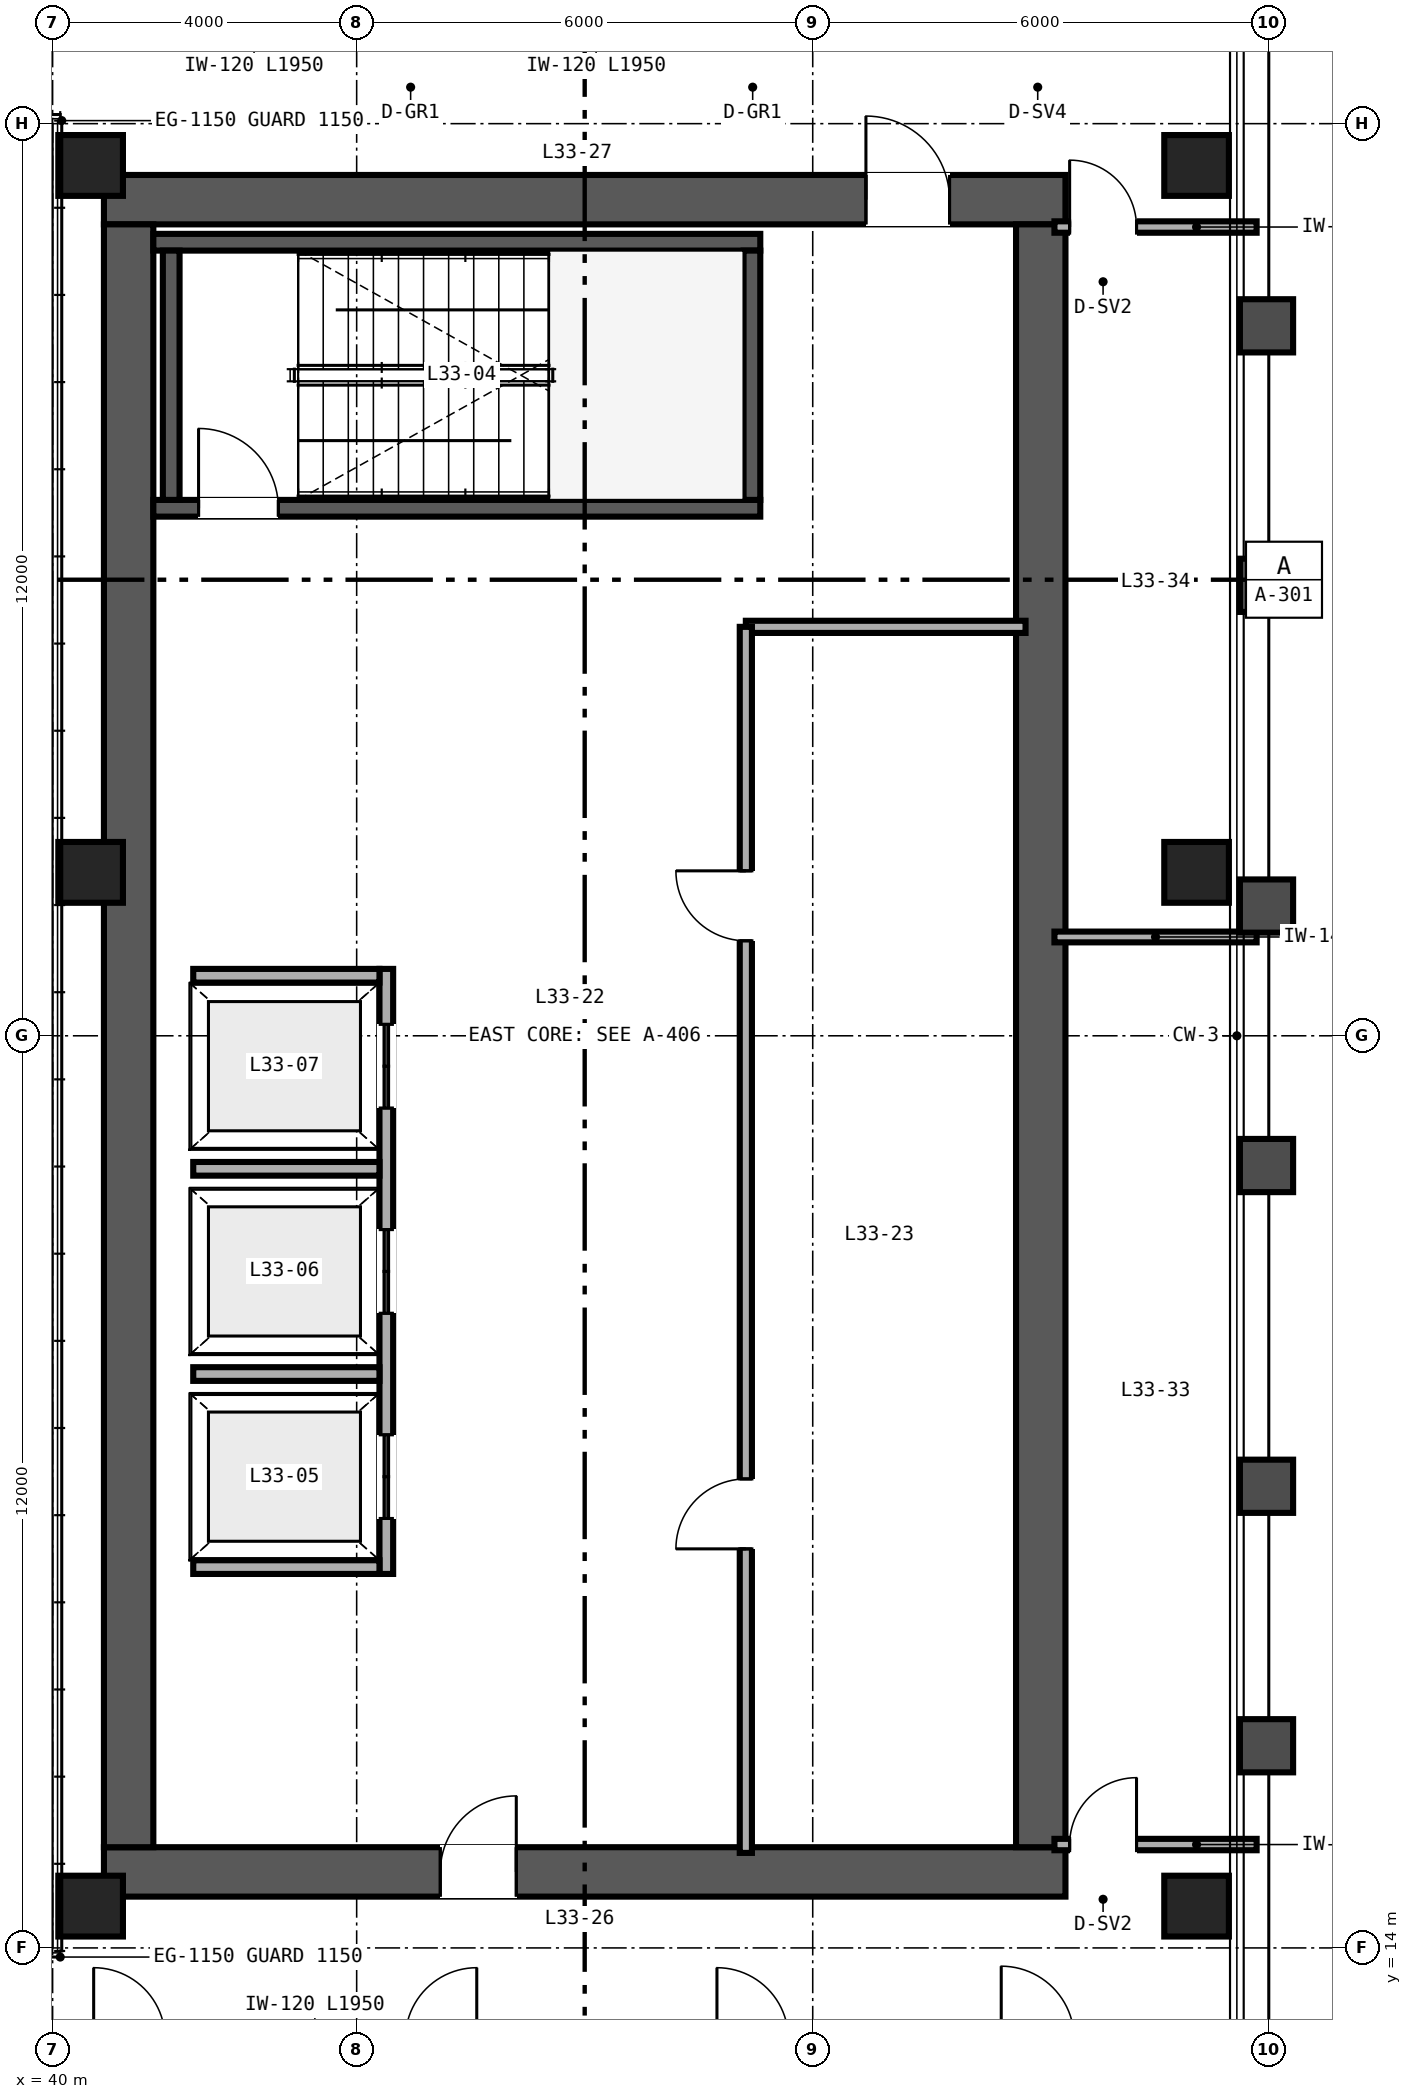
"""IFC4 building model, lengths in metres.
Left out: names, types, materials, properties, quantities, classifications, styles, units other than length and angle.
Written with IfcOpenShell. Run it as: python <this file> out.ifc"""

import sys

from ifc_helpers import new_model, si_unit, direction, frame, frame_2d, origin, origin_2d, place, context, subcontext, project, spatial, rectangle, hollow_rectangle, extrude, source, transform, mapped, element, fill, save


model = new_model("IFC4")
c1 = context("Model", 3, precision=1e-05, world=origin(), true_north=direction((0.0, 1.0)))
c2 = subcontext(c1, "Body", "Model", "MODEL_VIEW")
j1 = project(units=[si_unit("LENGTHUNIT", "METRE"), si_unit("PLANEANGLEUNIT", "RADIAN")], contexts=[c1])
p1 = place(None, origin())
s1 = spatial("IfcSite", under=j1, at=p1, CompositionType="ELEMENT")
p2 = place(p1, origin())
s2 = spatial("IfcBuilding", under=s1, at=p2, CompositionType="ELEMENT")
p3 = place(p2, frame((0.0, 0.0, 133.2)))
s3 = spatial("IfcBuildingStorey", under=s2, at=p3, CompositionType="ELEMENT", Elevation=133.2)
p4 = place(p3, frame((40.675, 15.0, 0.0), z_axis=(0.0, 0.0, 1.0), x_axis=(1.0, 0.0, 0.0)))
e1 = element("IfcWall", 1, at=p4, inside=s3, PredefinedType="SHEAR", context=c2, shape_type="SweptSolid", body=[
    extrude(rectangle(XDim=12.65, YDim=0.65, at=frame_2d((6.325, 0.0))), origin(), (0.0, 0.0, 1.0), 3.36),
])
p5 = place(p4, frame((4.425, 0.0, 0.0)))
e2 = element("IfcOpeningElement", 2, at=p5, cuts=e1, PredefinedType="OPENING", context=c2, shape_type="SweptSolid", body=[
    extrude(rectangle(XDim=1.0, YDim=2.15, at=frame_2d((0.5, 1.075))), frame((0.0, 0.335, 0.0), z_axis=(0.0, -1.0, 0.0), x_axis=(1.0, 0.0, 0.0)), (0.0, 0.0, 1.0), 0.67),
])
p6 = place(p3, frame((40.675, 37.0, 0.0), z_axis=(0.0, 0.0, 1.0), x_axis=(1.0, 0.0, 0.0)))
e3 = element("IfcWall", 3, at=p6, inside=s3, PredefinedType="SHEAR", context=c2, shape_type="SweptSolid", body=[
    extrude(rectangle(XDim=12.65, YDim=0.65, at=frame_2d((6.325, 0.0))), origin(), (0.0, 0.0, 1.0), 3.36),
])
p7 = place(p6, frame((10.025, 0.0, 0.0)))
e4 = element("IfcOpeningElement", 4, at=p7, cuts=e3, PredefinedType="OPENING", context=c2, shape_type="SweptSolid", body=[
    extrude(rectangle(XDim=1.1, YDim=2.15, at=frame_2d((0.55, 1.075))), frame((0.0, 0.335, 0.0), z_axis=(0.0, -1.0, 0.0), x_axis=(1.0, 0.0, 0.0)), (0.0, 0.0, 1.0), 0.67),
])
for number, where, z_axis, x_axis in (
    (5, (41.0, 15.325, 0.0), (0.0, 0.0, 1.0), (0.0, 1.0, 0.0)),
    (6, (53.0, 15.325, 0.0), (0.0, 0.0, 1.0), (0.0, 1.0, 0.0)),
):
    element("IfcWall", number, at=place(p3, frame(where, z_axis=z_axis, x_axis=x_axis)), inside=s3, PredefinedType="SHEAR", context=c2, shape_type="SweptSolid", body=[
        extrude(rectangle(XDim=21.35, YDim=0.65, at=frame_2d((10.675, 0.0))), origin(), (0.0, 0.0, 1.0), 3.36),
    ])
p8 = place(p3, frame((41.325, 32.94, 0.0), z_axis=(0.0, 0.0, 1.0), x_axis=(1.0, 0.0, 0.0)))
e7 = element("IfcWall", 7, at=p8, inside=s3, PredefinedType="SHEAR", context=c2, shape_type="SweptSolid", body=[
    extrude(rectangle(XDim=7.985, YDim=0.22, at=frame_2d((3.993, 0.0))), origin(), (0.0, 0.0, 1.0), 3.4),
])
p9 = place(p8, frame((0.595, 0.0, 0.0)))
e8 = element("IfcOpeningElement", 8, at=p9, cuts=e7, PredefinedType="OPENING", context=c2, shape_type="SweptSolid", body=[
    extrude(rectangle(XDim=1.05, YDim=2.15, at=frame_2d((0.525, 1.075))), frame((0.0, 0.12, 0.0), z_axis=(0.0, -1.0, 0.0), x_axis=(1.0, 0.0, 0.0)), (0.0, 0.0, 1.0), 0.24),
])
p10 = place(p3, frame((41.325, 36.44, 0.0), z_axis=(0.0, 0.0, 1.0), x_axis=(1.0, 0.0, 0.0)))
e9 = element("IfcWall", 9, at=p10, inside=s3, PredefinedType="SHEAR", context=c2, shape_type="SweptSolid", body=[
    extrude(rectangle(XDim=7.985, YDim=0.22, at=frame_2d((3.993, 0.0))), origin(), (0.0, 0.0, 1.0), 3.4),
])
for number, where, z_axis, x_axis in (
    (10, (41.56, 33.05, 0.0), (0.0, 0.0, 1.0), (0.0, 1.0, 0.0)),
    (11, (49.2, 33.05, 0.0), (0.0, 0.0, 1.0), (0.0, 1.0, 0.0)),
):
    element("IfcWall", number, at=place(p3, frame(where, z_axis=z_axis, x_axis=x_axis)), inside=s3, PredefinedType="SHEAR", context=c2, shape_type="SweptSolid", body=[
        extrude(rectangle(XDim=3.28, YDim=0.22, at=frame_2d((1.64, 0.0))), origin(), (0.0, 0.0, 1.0), 3.4),
    ])
m1 = source(origin(), c2, "Body", "SweptSolid", [
    extrude(hollow_rectangle(XDim=0.85, YDim=0.8, WallThickness=0.032, at=origin_2d()), origin(), (0.0, 0.0, 1.0), 3.36),
])
for number, where, z_axis, x_axis in (
    (12, (40.5, 14.55, 0.0), (0.0, 0.0, 1.0), (1.0, 0.0, 0.0)),
    (13, (55.05, 14.55, 0.0), (0.0, 0.0, 1.0), (1.0, 0.0, 0.0)),
    (14, (40.5, 28.15, 0.0), (0.0, 0.0, 1.0), (1.0, 0.0, 0.0)),
    (15, (55.05, 28.15, 0.0), (0.0, 0.0, 1.0), (1.0, 0.0, 0.0)),
    (16, (40.5, 37.45, 0.0), (0.0, 0.0, 1.0), (1.0, 0.0, 0.0)),
    (17, (55.05, 37.45, 0.0), (0.0, 0.0, 1.0), (1.0, 0.0, 0.0)),
):
    element("IfcColumn", number, at=place(p3, frame(where, z_axis=z_axis, x_axis=x_axis)), inside=s3, PredefinedType="COLUMN", context=c2, shape_type="MappedRepresentation", body=[
        mapped(m1, transform((0.0, 0.0, 0.0), scale=1.0)),
    ])
p11 = place(p3, frame((44.39, 18.92, 0.0), z_axis=(0.0, 0.0, 1.0), x_axis=(0.0, 1.0, 0.0)))
e18 = element("IfcWall", 18, at=p11, inside=s3, PredefinedType="SOLIDWALL", context=c2, shape_type="SweptSolid", body=[
    extrude(rectangle(XDim=7.96, YDim=0.18, at=frame_2d((3.98, 0.0))), origin(), (0.0, 0.0, 1.0), 3.36),
])
p12 = place(p11, frame((0.73, 0.0, 0.0)))
e19 = element("IfcOpeningElement", 19, at=p12, cuts=e18, PredefinedType="OPENING", context=c2, shape_type="SweptSolid", body=[
    extrude(rectangle(XDim=1.1, YDim=2.2, at=frame_2d((0.55, 1.1))), frame((0.0, 0.1, 0.0), z_axis=(0.0, -1.0, 0.0), x_axis=(1.0, 0.0, 0.0)), (0.0, 0.0, 1.0), 0.2),
])
p13 = place(p11, frame((3.43, 0.0, 0.0)))
e20 = element("IfcOpeningElement", 20, at=p13, cuts=e18, PredefinedType="OPENING", context=c2, shape_type="SweptSolid", body=[
    extrude(rectangle(XDim=1.1, YDim=2.2, at=frame_2d((0.55, 1.1))), frame((0.0, 0.1, 0.0), z_axis=(0.0, -1.0, 0.0), x_axis=(1.0, 0.0, 0.0)), (0.0, 0.0, 1.0), 0.2),
])
p14 = place(p11, frame((6.13, 0.0, 0.0)))
e21 = element("IfcOpeningElement", 21, at=p14, cuts=e18, PredefinedType="OPENING", context=c2, shape_type="SweptSolid", body=[
    extrude(rectangle(XDim=1.1, YDim=2.2, at=frame_2d((0.55, 1.1))), frame((0.0, 0.1, 0.0), z_axis=(0.0, -1.0, 0.0), x_axis=(1.0, 0.0, 0.0)), (0.0, 0.0, 1.0), 0.2),
])
for number, where, z_axis, x_axis in (
    (22, (41.85, 19.01, 0.0), (0.0, 0.0, 1.0), (1.0, 0.0, 0.0)),
    (23, (41.85, 26.79, 0.0), (0.0, 0.0, 1.0), (1.0, 0.0, 0.0)),
    (24, (41.85, 21.55, 0.0), (0.0, 0.0, 1.0), (1.0, 0.0, 0.0)),
    (25, (41.85, 24.25, 0.0), (0.0, 0.0, 1.0), (1.0, 0.0, 0.0)),
):
    element("IfcWall", number, at=place(p3, frame(where, z_axis=z_axis, x_axis=x_axis)), inside=s3, PredefinedType="SOLIDWALL", context=c2, shape_type="SweptSolid", body=[
        extrude(rectangle(XDim=2.45, YDim=0.18, at=frame_2d((1.225, 0.0))), origin(), (0.0, 0.0, 1.0), 3.36),
    ])
p15 = place(p3, frame((49.12, 31.38, 0.0), z_axis=(0.0, 0.0, 1.0), x_axis=(1.0, 0.0, 0.0)))
e26 = element("IfcWall", 26, at=p15, inside=s3, PredefinedType="PARTITIONING", context=c2, shape_type="SweptSolid", body=[
    extrude(rectangle(XDim=3.68, YDim=0.16, at=frame_2d((1.84, 0.0))), origin(), (0.0, 0.0, 1.0), 2.36),
])
p16 = place(p3, frame((49.12, 15.25, 0.0), z_axis=(0.0, 0.0, 1.0), x_axis=(0.0, 1.0, 0.0)))
e27 = element("IfcWall", 27, at=p16, inside=s3, PredefinedType="PARTITIONING", context=c2, shape_type="SweptSolid", body=[
    extrude(rectangle(XDim=16.13, YDim=0.16, at=frame_2d((8.065, 0.0))), origin(), (0.0, 0.0, 1.0), 2.36),
])
p17 = place(p16, frame((4.0, 0.0, 0.0)))
e28 = element("IfcOpeningElement", 28, at=p17, cuts=e27, PredefinedType="OPENING", context=c2, shape_type="SweptSolid", body=[
    extrude(rectangle(XDim=0.92, YDim=2.15, at=frame_2d((0.46, 1.075))), frame((0.0, 0.09, 0.0), z_axis=(0.0, -1.0, 0.0), x_axis=(1.0, 0.0, 0.0)), (0.0, 0.0, 1.0), 0.18),
])
p18 = place(p16, frame((12.0, 0.0, 0.0)))
e29 = element("IfcOpeningElement", 29, at=p18, cuts=e27, PredefinedType="OPENING", context=c2, shape_type="SweptSolid", body=[
    extrude(rectangle(XDim=0.92, YDim=2.15, at=frame_2d((0.46, 1.075))), frame((0.0, 0.09, 0.0), z_axis=(0.0, -1.0, 0.0), x_axis=(1.0, 0.0, 0.0)), (0.0, 0.0, 1.0), 0.18),
])
p19 = place(p3, frame((53.18, 15.36, 0.0), z_axis=(0.0, 0.0, 1.0), x_axis=(1.0, 0.0, 0.0)))
e30 = element("IfcWall", 30, at=p19, inside=s3, PredefinedType="PARTITIONING", context=c2, shape_type="SweptSolid", body=[
    extrude(rectangle(XDim=2.66, YDim=0.15, at=frame_2d((1.33, 0.0))), origin(), (0.0, 0.0, 1.0), 2.581),
])
p20 = place(p19, frame((0.2, 0.0, 0.0)))
e31 = element("IfcOpeningElement", 31, at=p20, cuts=e30, PredefinedType="OPENING", context=c2, shape_type="SweptSolid", body=[
    extrude(rectangle(XDim=0.88, YDim=2.15, at=frame_2d((0.44, 1.075))), frame((0.0, 0.085, 0.0), z_axis=(0.0, -1.0, 0.0), x_axis=(1.0, 0.0, 0.0)), (0.0, 0.0, 1.0), 0.17),
])
p21 = place(p3, frame((53.18, 36.64, 0.0), z_axis=(0.0, 0.0, 1.0), x_axis=(1.0, 0.0, 0.0)))
e32 = element("IfcWall", 32, at=p21, inside=s3, PredefinedType="PARTITIONING", context=c2, shape_type="SweptSolid", body=[
    extrude(rectangle(XDim=2.66, YDim=0.15, at=frame_2d((1.33, 0.0))), origin(), (0.0, 0.0, 1.0), 2.743),
])
p22 = place(p21, frame((0.2, 0.0, 0.0)))
e33 = element("IfcOpeningElement", 33, at=p22, cuts=e32, PredefinedType="OPENING", context=c2, shape_type="SweptSolid", body=[
    extrude(rectangle(XDim=0.88, YDim=2.15, at=frame_2d((0.44, 1.075))), frame((0.0, 0.085, 0.0), z_axis=(0.0, -1.0, 0.0), x_axis=(1.0, 0.0, 0.0)), (0.0, 0.0, 1.0), 0.17),
])
p23 = place(p3, frame((53.18, 27.3, 0.0), z_axis=(0.0, 0.0, 1.0), x_axis=(1.0, 0.0, 0.0)))
e34 = element("IfcWall", 34, at=p23, inside=s3, PredefinedType="PARTITIONING", context=c2, shape_type="SweptSolid", body=[
    extrude(rectangle(XDim=2.66, YDim=0.142, at=frame_2d((1.33, 0.0))), origin(), (0.0, 0.0, 1.0), 2.581),
])
m2 = source(origin(), c2, "Body", "SweptSolid", [
    extrude(rectangle(XDim=1.05, YDim=2.15, at=frame_2d((0.525, 1.075))), frame((0.0, 0.025, 0.0), z_axis=(0.0, -1.0, 0.0), x_axis=(1.0, 0.0, 0.0)), (0.0, 0.0, 1.0), 0.05),
])
p24 = place(p9, origin())
e35 = element("IfcDoor", 35, at=p24, inside=s3, OperationType="SINGLE_SWING_LEFT", PredefinedType="DOOR", context=c2, shape_type="MappedRepresentation", body=[
    mapped(m2, transform((0.0, 0.0, 0.0), scale=1.0)),
])
fill(e8, e35)
m3 = source(origin(), c2, "Body", "SweptSolid", [
    extrude(rectangle(XDim=1.1, YDim=2.2, at=frame_2d((0.55, 1.1))), frame((0.0, 0.025, 0.0), z_axis=(0.0, -1.0, 0.0), x_axis=(1.0, 0.0, 0.0)), (0.0, 0.0, 1.0), 0.05),
])
p25 = place(p12, origin())
e36 = element("IfcDoor", 36, at=p25, inside=s3, OperationType="DOUBLE_DOOR_SLIDING", PredefinedType="DOOR", context=c2, shape_type="MappedRepresentation", body=[
    mapped(m3, transform((0.0, 0.0, 0.0), scale=1.0)),
])
fill(e19, e36)
p26 = place(p13, origin())
e37 = element("IfcDoor", 37, at=p26, inside=s3, OperationType="DOUBLE_DOOR_SLIDING", PredefinedType="DOOR", context=c2, shape_type="MappedRepresentation", body=[
    mapped(m3, transform((0.0, 0.0, 0.0), scale=1.0)),
])
fill(e20, e37)
p27 = place(p14, origin())
e38 = element("IfcDoor", 38, at=p27, inside=s3, OperationType="DOUBLE_DOOR_SLIDING", PredefinedType="DOOR", context=c2, shape_type="MappedRepresentation", body=[
    mapped(m3, transform((0.0, 0.0, 0.0), scale=1.0)),
])
fill(e21, e38)
m4 = source(origin(), c2, "Body", "SweptSolid", [
    extrude(rectangle(XDim=1.0, YDim=2.15, at=frame_2d((0.5, 1.075))), frame((0.0, 0.025, 0.0), z_axis=(0.0, -1.0, 0.0), x_axis=(1.0, 0.0, 0.0)), (0.0, 0.0, 1.0), 0.05),
])
p28 = place(p5, origin())
e39 = element("IfcDoor", 39, at=p28, inside=s3, OperationType="SINGLE_SWING_RIGHT", PredefinedType="DOOR", context=c2, shape_type="MappedRepresentation", body=[
    mapped(m4, transform((0.0, 0.0, 0.0), scale=1.0)),
])
fill(e2, e39)
m5 = source(origin(), c2, "Body", "SweptSolid", [
    extrude(rectangle(XDim=1.1, YDim=2.15, at=frame_2d((0.55, 1.075))), frame((0.0, 0.025, 0.0), z_axis=(0.0, -1.0, 0.0), x_axis=(1.0, 0.0, 0.0)), (0.0, 0.0, 1.0), 0.05),
])
p29 = place(p7, origin())
e40 = element("IfcDoor", 40, at=p29, inside=s3, OperationType="SINGLE_SWING_LEFT", PredefinedType="DOOR", context=c2, shape_type="MappedRepresentation", body=[
    mapped(m5, transform((0.0, 0.0, 0.0), scale=1.0)),
])
fill(e4, e40)
m6 = source(origin(), c2, "Body", "SweptSolid", [
    extrude(rectangle(XDim=0.92, YDim=2.15, at=frame_2d((0.46, 1.075))), frame((0.0, 0.025, 0.0), z_axis=(0.0, -1.0, 0.0), x_axis=(1.0, 0.0, 0.0)), (0.0, 0.0, 1.0), 0.05),
])
p30 = place(p17, origin())
e41 = element("IfcDoor", 41, at=p30, inside=s3, OperationType="SINGLE_SWING_LEFT", PredefinedType="DOOR", context=c2, shape_type="MappedRepresentation", body=[
    mapped(m6, transform((0.0, 0.0, 0.0), scale=1.0)),
])
fill(e28, e41)
p31 = place(p18, origin())
e42 = element("IfcDoor", 42, at=p31, inside=s3, OperationType="SINGLE_SWING_RIGHT", PredefinedType="DOOR", context=c2, shape_type="MappedRepresentation", body=[
    mapped(m6, transform((0.0, 0.0, 0.0), scale=1.0)),
])
fill(e29, e42)
m7 = source(origin(), c2, "Body", "SweptSolid", [
    extrude(rectangle(XDim=0.88, YDim=2.15, at=frame_2d((0.44, 1.075))), frame((0.0, 0.025, 0.0), z_axis=(0.0, -1.0, 0.0), x_axis=(1.0, 0.0, 0.0)), (0.0, 0.0, 1.0), 0.05),
])
p32 = place(p20, origin())
e43 = element("IfcDoor", 43, at=p32, inside=s3, OperationType="SINGLE_SWING_RIGHT", PredefinedType="DOOR", context=c2, shape_type="MappedRepresentation", body=[
    mapped(m7, transform((0.0, 0.0, 0.0), scale=1.0)),
])
fill(e31, e43)
p33 = place(p22, origin())
e44 = element("IfcDoor", 44, at=p33, inside=s3, OperationType="SINGLE_SWING_LEFT", PredefinedType="DOOR", context=c2, shape_type="MappedRepresentation", body=[
    mapped(m7, transform((0.0, 0.0, 0.0), scale=1.0)),
])
fill(e33, e44)
save(model, sys.argv[1])
